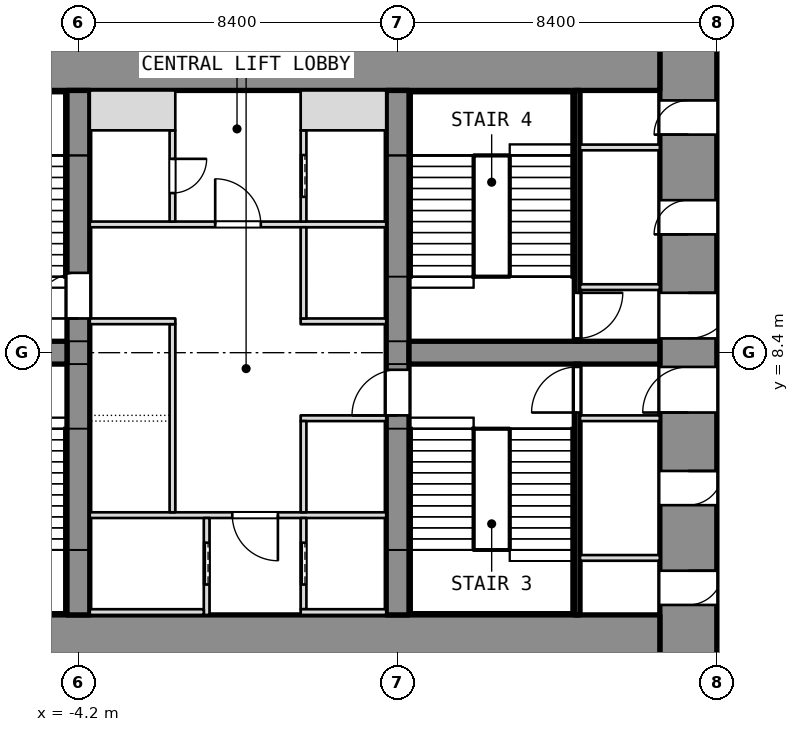
"""IFC4 building model, lengths in metres.
Left out: names, types, materials, properties, quantities, classifications, styles, units other than length and angle.
Written with IfcOpenShell. Run it as: python <this file> out.ifc"""

import sys

from ifc_helpers import new_model, si_unit, direction, frame, frame_2d, origin, place, context, subcontext, project, spatial, rectangle, extrude, element, fill, save


model = new_model("IFC4")
c1 = context("Model", 3, precision=1e-05, world=origin(), true_north=direction((0.0, 1.0)))
c2 = subcontext(c1, "Body", "Model", "MODEL_VIEW")
j1 = project(units=[si_unit("LENGTHUNIT", "METRE"), si_unit("PLANEANGLEUNIT", "RADIAN")], contexts=[c1])
p1 = place(None, origin())
s1 = spatial("IfcSite", under=j1, at=p1, CompositionType="ELEMENT")
p2 = place(p1, origin())
s2 = spatial("IfcBuilding", under=s1, at=p2, CompositionType="ELEMENT")
p3 = place(p2, frame((0.0, 0.0, 13.0)))
s3 = spatial("IfcBuildingStorey", under=s2, at=p3, CompositionType="ELEMENT", Elevation=13.0)
p4 = place(p3, frame((11.85, 0.0, 0.0), z_axis=(0.0, 0.0, 1.0), x_axis=(0.0, 1.0, 0.0)))
e1 = element("IfcWall", 1, at=p4, inside=s3, PredefinedType="SHEAR", context=c2, shape_type="SweptSolid", body=[
    extrude(rectangle(XDim=16.8, YDim=1.5, at=frame_2d((8.4, 0.0))), origin(), (0.0, 0.0, 1.0), 8.0),
])
p5 = place(p4, frame((1.762, 0.0, 0.0)))
e2 = element("IfcOpeningElement", 2, at=p5, cuts=e1, PredefinedType="OPENING", context=c2, shape_type="SweptSolid", body=[
    extrude(rectangle(XDim=0.9, YDim=2.1, at=frame_2d((0.45, 1.05))), frame((0.0, 0.75, 0.0), z_axis=(0.0, -1.0, 0.0), x_axis=(1.0, 0.0, 0.0)), (0.0, 0.0, 1.0), 1.5),
])
p6 = place(p4, frame((4.387, 0.0, 0.0)))
e3 = element("IfcOpeningElement", 3, at=p6, cuts=e1, PredefinedType="OPENING", context=c2, shape_type="SweptSolid", body=[
    extrude(rectangle(XDim=0.9, YDim=2.1, at=frame_2d((0.45, 1.05))), frame((0.0, 0.75, 0.0), z_axis=(0.0, -1.0, 0.0), x_axis=(1.0, 0.0, 0.0)), (0.0, 0.0, 1.0), 1.5),
])
p7 = place(p4, frame((6.825, 0.0, 0.0)))
e4 = element("IfcOpeningElement", 4, at=p7, cuts=e1, PredefinedType="OPENING", context=c2, shape_type="SweptSolid", body=[
    extrude(rectangle(XDim=1.2, YDim=2.1, at=frame_2d((0.6, 1.05))), frame((0.0, 0.75, 0.0), z_axis=(0.0, -1.0, 0.0), x_axis=(1.0, 0.0, 0.0)), (0.0, 0.0, 1.0), 1.5),
])
p8 = place(p4, frame((14.137, 0.0, 0.0)))
e5 = element("IfcOpeningElement", 5, at=p8, cuts=e1, PredefinedType="OPENING", context=c2, shape_type="SweptSolid", body=[
    extrude(rectangle(XDim=0.9, YDim=2.1, at=frame_2d((0.45, 1.05))), frame((0.0, 0.75, 0.0), z_axis=(0.0, -1.0, 0.0), x_axis=(1.0, 0.0, 0.0)), (0.0, 0.0, 1.0), 1.5),
])
p9 = place(p4, frame((11.512, 0.0, 0.0)))
e6 = element("IfcOpeningElement", 6, at=p9, cuts=e1, PredefinedType="OPENING", context=c2, shape_type="SweptSolid", body=[
    extrude(rectangle(XDim=0.9, YDim=2.1, at=frame_2d((0.45, 1.05))), frame((0.0, 0.75, 0.0), z_axis=(0.0, -1.0, 0.0), x_axis=(1.0, 0.0, 0.0)), (0.0, 0.0, 1.0), 1.5),
])
p10 = place(p4, frame((8.775, 0.0, 0.0)))
e7 = element("IfcOpeningElement", 7, at=p10, cuts=e1, PredefinedType="OPENING", context=c2, shape_type="SweptSolid", body=[
    extrude(rectangle(XDim=1.2, YDim=2.1, at=frame_2d((0.6, 1.05))), frame((0.0, 0.75, 0.0), z_axis=(0.0, -1.0, 0.0), x_axis=(1.0, 0.0, 0.0)), (0.0, 0.0, 1.0), 1.5),
])
for number, where, z_axis, x_axis in (
    (8, (-11.1, 0.75, 0.0), (0.0, 0.0, 1.0), (1.0, 0.0, 0.0)),
    (9, (-11.1, 16.05, 0.0), (0.0, 0.0, 1.0), (1.0, 0.0, 0.0)),
):
    element("IfcWall", number, at=place(p3, frame(where, z_axis=z_axis, x_axis=x_axis)), inside=s3, PredefinedType="SHEAR", context=c2, shape_type="SweptSolid", body=[
        extrude(rectangle(XDim=22.2, YDim=1.5, at=frame_2d((11.1, 0.0))), origin(), (0.0, 0.0, 1.0), 8.0),
    ])
p11 = place(p3, frame((-4.2, 1.5, 0.0), z_axis=(0.0, 0.0, 1.0), x_axis=(0.0, 1.0, 0.0)))
e10 = element("IfcWall", 10, at=p11, inside=s3, PredefinedType="SHEAR", context=c2, shape_type="SweptSolid", body=[
    extrude(rectangle(XDim=13.8, YDim=0.6, at=frame_2d((6.9, 0.0))), origin(), (0.0, 0.0, 1.0), 8.0),
])
p12 = place(p11, frame((7.8, 0.0, 0.0)))
e11 = element("IfcOpeningElement", 11, at=p12, cuts=e10, PredefinedType="OPENING", context=c2, shape_type="SweptSolid", body=[
    extrude(rectangle(XDim=1.2, YDim=2.1, at=frame_2d((0.6, 1.05))), frame((0.0, 0.3, 0.0), z_axis=(0.0, -1.0, 0.0), x_axis=(1.0, 0.0, 0.0)), (0.0, 0.0, 1.0), 0.6),
])
p13 = place(p3, frame((4.2, 1.5, 0.0), z_axis=(0.0, 0.0, 1.0), x_axis=(0.0, 1.0, 0.0)))
e12 = element("IfcWall", 12, at=p13, inside=s3, PredefinedType="SHEAR", context=c2, shape_type="SweptSolid", body=[
    extrude(rectangle(XDim=13.8, YDim=0.6, at=frame_2d((6.9, 0.0))), origin(), (0.0, 0.0, 1.0), 8.0),
])
p14 = place(p13, frame((5.25, 0.0, 0.0)))
e13 = element("IfcOpeningElement", 13, at=p14, cuts=e12, PredefinedType="OPENING", context=c2, shape_type="SweptSolid", body=[
    extrude(rectangle(XDim=1.2, YDim=2.1, at=frame_2d((0.6, 1.05))), frame((0.0, 0.3, 0.0), z_axis=(0.0, -1.0, 0.0), x_axis=(1.0, 0.0, 0.0)), (0.0, 0.0, 1.0), 0.6),
])
for number, where, z_axis, x_axis in (
    (14, (-11.1, 8.4, 0.0), (0.0, 0.0, 1.0), (1.0, 0.0, 0.0)),
    (15, (4.5, 8.4, 0.0), (0.0, 0.0, 1.0), (1.0, 0.0, 0.0)),
):
    element("IfcWall", number, at=place(p3, frame(where, z_axis=z_axis, x_axis=x_axis)), inside=s3, PredefinedType="SHEAR", context=c2, shape_type="SweptSolid", body=[
        extrude(rectangle(XDim=6.6, YDim=0.6, at=frame_2d((3.3, 0.0))), origin(), (0.0, 0.0, 1.0), 8.0),
    ])
p15 = place(p3, frame((8.925, 1.5, 0.0), z_axis=(0.0, 0.0, 1.0), x_axis=(0.0, 1.0, 0.0)))
e16 = element("IfcWall", 16, at=p15, inside=s3, PredefinedType="SHEAR", context=c2, shape_type="SweptSolid", body=[
    extrude(rectangle(XDim=6.6, YDim=0.15, at=frame_2d((3.3, 0.0))), origin(), (0.0, 0.0, 1.0), 7.78),
])
p16 = place(p15, frame((5.325, 0.0, 0.0)))
e17 = element("IfcOpeningElement", 17, at=p16, cuts=e16, PredefinedType="OPENING", context=c2, shape_type="SweptSolid", body=[
    extrude(rectangle(XDim=1.2, YDim=2.1, at=frame_2d((0.6, 1.05))), frame((0.0, 0.075, 0.0), z_axis=(0.0, -1.0, 0.0), x_axis=(1.0, 0.0, 0.0)), (0.0, 0.0, 1.0), 0.15),
])
for number, where, z_axis, x_axis in (
    (18, (9.0, 6.675, 0.0), (0.0, 0.0, 1.0), (1.0, 0.0, 0.0)),
    (19, (9.0, 3.0, 0.0), (0.0, 0.0, 1.0), (1.0, 0.0, 0.0)),
):
    element("IfcWall", number, at=place(p3, frame(where, z_axis=z_axis, x_axis=x_axis)), inside=s3, PredefinedType="PARTITIONING", context=c2, shape_type="SweptSolid", body=[
        extrude(rectangle(XDim=2.1, YDim=0.15, at=frame_2d((1.05, 0.0))), origin(), (0.0, 0.0, 1.0), 7.78),
    ])
p17 = place(p3, frame((8.925, 8.7, 0.0), z_axis=(0.0, 0.0, 1.0), x_axis=(0.0, 1.0, 0.0)))
e20 = element("IfcWall", 20, at=p17, inside=s3, PredefinedType="SHEAR", context=c2, shape_type="SweptSolid", body=[
    extrude(rectangle(XDim=6.6, YDim=0.15, at=frame_2d((3.3, 0.0))), origin(), (0.0, 0.0, 1.0), 7.78),
])
p18 = place(p17, frame((0.075, 0.0, 0.0)))
e21 = element("IfcOpeningElement", 21, at=p18, cuts=e20, PredefinedType="OPENING", context=c2, shape_type="SweptSolid", body=[
    extrude(rectangle(XDim=1.2, YDim=2.1, at=frame_2d((0.6, 1.05))), frame((0.0, 0.075, 0.0), z_axis=(0.0, -1.0, 0.0), x_axis=(1.0, 0.0, 0.0)), (0.0, 0.0, 1.0), 0.15),
])
for number, where, z_axis, x_axis in (
    (22, (9.0, 10.125, 0.0), (0.0, 0.0, 1.0), (1.0, 0.0, 0.0)),
    (23, (9.0, 13.8, 0.0), (0.0, 0.0, 1.0), (1.0, 0.0, 0.0)),
):
    element("IfcWall", number, at=place(p3, frame(where, z_axis=z_axis, x_axis=x_axis)), inside=s3, PredefinedType="PARTITIONING", context=c2, shape_type="SweptSolid", body=[
        extrude(rectangle(XDim=2.1, YDim=0.15, at=frame_2d((1.05, 0.0))), origin(), (0.0, 0.0, 1.0), 7.78),
    ])
p19 = place(p3, frame((-3.9, 4.125, 0.0), z_axis=(0.0, 0.0, 1.0), x_axis=(1.0, 0.0, 0.0)))
e24 = element("IfcWall", 24, at=p19, inside=s3, PredefinedType="PARTITIONING", context=c2, shape_type="SweptSolid", body=[
    extrude(rectangle(XDim=7.8, YDim=0.15, at=frame_2d((3.9, 0.0))), origin(), (0.0, 0.0, 1.0), 7.78),
])
p20 = place(p19, frame((3.75, 0.0, 0.0)))
e25 = element("IfcOpeningElement", 25, at=p20, cuts=e24, PredefinedType="OPENING", context=c2, shape_type="SweptSolid", body=[
    extrude(rectangle(XDim=1.2, YDim=2.1, at=frame_2d((0.6, 1.05))), frame((0.0, 0.075, 0.0), z_axis=(0.0, -1.0, 0.0), x_axis=(1.0, 0.0, 0.0)), (0.0, 0.0, 1.0), 0.15),
])
p21 = place(p3, frame((-3.9, 11.775, 0.0), z_axis=(0.0, 0.0, 1.0), x_axis=(1.0, 0.0, 0.0)))
e26 = element("IfcWall", 26, at=p21, inside=s3, PredefinedType="PARTITIONING", context=c2, shape_type="SweptSolid", body=[
    extrude(rectangle(XDim=7.8, YDim=0.15, at=frame_2d((3.9, 0.0))), origin(), (0.0, 0.0, 1.0), 7.78),
])
p22 = place(p21, frame((3.3, 0.0, 0.0)))
e27 = element("IfcOpeningElement", 27, at=p22, cuts=e26, PredefinedType="OPENING", context=c2, shape_type="SweptSolid", body=[
    extrude(rectangle(XDim=1.2, YDim=2.1, at=frame_2d((0.6, 1.05))), frame((0.0, 0.075, 0.0), z_axis=(0.0, -1.0, 0.0), x_axis=(1.0, 0.0, 0.0)), (0.0, 0.0, 1.0), 0.15),
])
p23 = place(p3, frame((-0.825, 1.5, 0.0), z_axis=(0.0, 0.0, 1.0), x_axis=(0.0, 1.0, 0.0)))
e28 = element("IfcWall", 28, at=p23, inside=s3, PredefinedType="SHEAR", context=c2, shape_type="SweptSolid", body=[
    extrude(rectangle(XDim=2.55, YDim=0.15, at=frame_2d((1.275, 0.0))), origin(), (0.0, 0.0, 1.0), 8.0),
])
p24 = place(p23, frame((0.8, 0.0, 0.0)))
e29 = element("IfcOpeningElement", 29, at=p24, cuts=e28, PredefinedType="OPENING", context=c2, shape_type="SweptSolid", body=[
    extrude(rectangle(XDim=1.1, YDim=2.1, at=frame_2d((0.55, 1.05))), frame((0.0, 0.075, 0.0), z_axis=(0.0, -1.0, 0.0), x_axis=(1.0, 0.0, 0.0)), (0.0, 0.0, 1.0), 0.15),
])
p25 = place(p3, frame((-3.9, 1.575, 0.0), z_axis=(0.0, 0.0, 1.0), x_axis=(1.0, 0.0, 0.0)))
e30 = element("IfcWall", 30, at=p25, inside=s3, PredefinedType="SHEAR", context=c2, shape_type="SweptSolid", body=[
    extrude(rectangle(XDim=3.0, YDim=0.15, at=frame_2d((1.5, 0.0))), origin(), (0.0, 0.0, 1.0), 8.0),
])
p26 = place(p3, frame((-1.725, 4.2, 0.0), z_axis=(0.0, 0.0, 1.0), x_axis=(0.0, 1.0, 0.0)))
e31 = element("IfcWall", 31, at=p26, inside=s3, PredefinedType="SHEAR", context=c2, shape_type="SweptSolid", body=[
    extrude(rectangle(XDim=4.95, YDim=0.15, at=frame_2d((2.475, 0.0))), origin(), (0.0, 0.0, 1.0), 8.0),
])
p27 = place(p3, frame((-3.9, 9.225, 0.0), z_axis=(0.0, 0.0, 1.0), x_axis=(1.0, 0.0, 0.0)))
e32 = element("IfcWall", 32, at=p27, inside=s3, PredefinedType="SHEAR", context=c2, shape_type="SweptSolid", body=[
    extrude(rectangle(XDim=2.25, YDim=0.15, at=frame_2d((1.125, 0.0))), origin(), (0.0, 0.0, 1.0), 8.0),
])
p28 = place(p3, frame((-1.725, 11.85, 0.0), z_axis=(0.0, 0.0, 1.0), x_axis=(0.0, 1.0, 0.0)))
e33 = element("IfcWall", 33, at=p28, inside=s3, PredefinedType="PARTITIONING", context=c2, shape_type="SweptSolid", body=[
    extrude(rectangle(XDim=2.4, YDim=0.15, at=frame_2d((1.2, 0.0))), origin(), (0.0, 0.0, 1.0), 7.78),
])
p29 = place(p28, frame((0.75, 0.0, 0.0)))
e34 = element("IfcOpeningElement", 34, at=p29, cuts=e33, PredefinedType="OPENING", context=c2, shape_type="SweptSolid", body=[
    extrude(rectangle(XDim=0.9, YDim=2.1, at=frame_2d((0.45, 1.05))), frame((0.0, 0.075, 0.0), z_axis=(0.0, -1.0, 0.0), x_axis=(1.0, 0.0, 0.0)), (0.0, 0.0, 1.0), 0.15),
])
p30 = place(p3, frame((-3.9, 14.775, 0.0), z_axis=(0.0, 0.0, 1.0), x_axis=(1.0, 0.0, 0.0)))
e35 = element("IfcWall", 35, at=p30, inside=s3, PredefinedType="PARTITIONING", context=c2, shape_type="SweptSolid", body=[
    extrude(rectangle(XDim=2.25, YDim=1.05, at=frame_2d((1.125, 0.0))), origin(), (0.0, 0.0, 1.0), 7.78),
])
p31 = place(p3, frame((1.725, 1.65, 0.0), z_axis=(0.0, 0.0, 1.0), x_axis=(0.0, 1.0, 0.0)))
e36 = element("IfcWall", 36, at=p31, inside=s3, PredefinedType="SHEAR", context=c2, shape_type="SweptSolid", body=[
    extrude(rectangle(XDim=2.4, YDim=0.15, at=frame_2d((1.2, 0.0))), origin(), (0.0, 0.0, 1.0), 8.0),
])
p32 = place(p31, frame((0.65, 0.0, 0.0)))
e37 = element("IfcOpeningElement", 37, at=p32, cuts=e36, PredefinedType="OPENING", context=c2, shape_type="SweptSolid", body=[
    extrude(rectangle(XDim=1.1, YDim=2.1, at=frame_2d((0.55, 1.05))), frame((0.0, 0.075, 0.0), z_axis=(0.0, -1.0, 0.0), x_axis=(1.0, 0.0, 0.0)), (0.0, 0.0, 1.0), 0.15),
])
p33 = place(p3, frame((1.65, 1.575, 0.0), z_axis=(0.0, 0.0, 1.0), x_axis=(1.0, 0.0, 0.0)))
e38 = element("IfcWall", 38, at=p33, inside=s3, PredefinedType="SHEAR", context=c2, shape_type="SweptSolid", body=[
    extrude(rectangle(XDim=2.25, YDim=0.15, at=frame_2d((1.125, 0.0))), origin(), (0.0, 0.0, 1.0), 8.0),
])
p34 = place(p3, frame((1.725, 11.85, 0.0), z_axis=(0.0, 0.0, 1.0), x_axis=(0.0, 1.0, 0.0)))
e39 = element("IfcWall", 39, at=p34, inside=s3, PredefinedType="SHEAR", context=c2, shape_type="SweptSolid", body=[
    extrude(rectangle(XDim=2.4, YDim=0.15, at=frame_2d((1.2, 0.0))), origin(), (0.0, 0.0, 1.0), 8.0),
])
p35 = place(p34, frame((0.65, 0.0, 0.0)))
e40 = element("IfcOpeningElement", 40, at=p35, cuts=e39, PredefinedType="OPENING", context=c2, shape_type="SweptSolid", body=[
    extrude(rectangle(XDim=1.1, YDim=2.1, at=frame_2d((0.55, 1.05))), frame((0.0, 0.075, 0.0), z_axis=(0.0, -1.0, 0.0), x_axis=(1.0, 0.0, 0.0)), (0.0, 0.0, 1.0), 0.15),
])
p36 = place(p3, frame((1.65, 14.775, 0.0), z_axis=(0.0, 0.0, 1.0), x_axis=(1.0, 0.0, 0.0)))
e41 = element("IfcWall", 41, at=p36, inside=s3, PredefinedType="SHEAR", context=c2, shape_type="SweptSolid", body=[
    extrude(rectangle(XDim=2.25, YDim=1.05, at=frame_2d((1.125, 0.0))), origin(), (0.0, 0.0, 1.0), 8.0),
])
for number, where, z_axis, x_axis in (
    (42, (1.65, 6.675, 0.0), (0.0, 0.0, 1.0), (1.0, 0.0, 0.0)),
    (43, (1.65, 9.225, 0.0), (0.0, 0.0, 1.0), (1.0, 0.0, 0.0)),
):
    element("IfcWall", number, at=place(p3, frame(where, z_axis=z_axis, x_axis=x_axis)), inside=s3, PredefinedType="SHEAR", context=c2, shape_type="SweptSolid", body=[
        extrude(rectangle(XDim=2.25, YDim=0.15, at=frame_2d((1.125, 0.0))), origin(), (0.0, 0.0, 1.0), 8.0),
    ])
p37 = place(p3, frame((1.725, 4.2, 0.0), z_axis=(0.0, 0.0, 1.0), x_axis=(0.0, 1.0, 0.0)))
e44 = element("IfcWall", 44, at=p37, inside=s3, PredefinedType="SHEAR", context=c2, shape_type="SweptSolid", body=[
    extrude(rectangle(XDim=2.4, YDim=0.15, at=frame_2d((1.2, 0.0))), origin(), (0.0, 0.0, 1.0), 8.0),
])
p38 = place(p3, frame((1.725, 9.3, 0.0), z_axis=(0.0, 0.0, 1.0), x_axis=(0.0, 1.0, 0.0)))
e45 = element("IfcWall", 45, at=p38, inside=s3, PredefinedType="SHEAR", context=c2, shape_type="SweptSolid", body=[
    extrude(rectangle(XDim=2.4, YDim=0.15, at=frame_2d((1.2, 0.0))), origin(), (0.0, 0.0, 1.0), 8.0),
])
p39 = place(p5, origin())
e46 = element("IfcDoor", 46, at=p39, inside=s3, OperationType="SINGLE_SWING_LEFT", PredefinedType="DOOR", context=c2, shape_type="SweptSolid", body=[
    extrude(rectangle(XDim=0.9, YDim=2.1, at=frame_2d((0.45, 1.05))), frame((0.0, 0.025, 0.0), z_axis=(0.0, -1.0, 0.0), x_axis=(1.0, 0.0, 0.0)), (0.0, 0.0, 1.0), 0.05),
])
fill(e2, e46)
p40 = place(p6, origin())
e47 = element("IfcDoor", 47, at=p40, inside=s3, OperationType="SINGLE_SWING_LEFT", PredefinedType="DOOR", context=c2, shape_type="SweptSolid", body=[
    extrude(rectangle(XDim=0.9, YDim=2.1, at=frame_2d((0.45, 1.05))), frame((0.0, 0.025, 0.0), z_axis=(0.0, -1.0, 0.0), x_axis=(1.0, 0.0, 0.0)), (0.0, 0.0, 1.0), 0.05),
])
fill(e3, e47)
p41 = place(p7, origin())
e48 = element("IfcDoor", 48, at=p41, inside=s3, OperationType="SINGLE_SWING_LEFT", PredefinedType="DOOR", context=c2, shape_type="SweptSolid", body=[
    extrude(rectangle(XDim=1.2, YDim=2.1, at=frame_2d((0.6, 1.05))), frame((0.0, 0.025, 0.0), z_axis=(0.0, -1.0, 0.0), x_axis=(1.0, 0.0, 0.0)), (0.0, 0.0, 1.0), 0.05),
])
fill(e4, e48)
p42 = place(p16, origin())
e49 = element("IfcDoor", 49, at=p42, inside=s3, OperationType="SINGLE_SWING_LEFT", PredefinedType="DOOR", context=c2, shape_type="SweptSolid", body=[
    extrude(rectangle(XDim=1.2, YDim=2.1, at=frame_2d((0.6, 1.05))), frame((0.0, 0.025, 0.0), z_axis=(0.0, -1.0, 0.0), x_axis=(1.0, 0.0, 0.0)), (0.0, 0.0, 1.0), 0.05),
])
fill(e17, e49)
p43 = place(p8, origin())
e50 = element("IfcDoor", 50, at=p43, inside=s3, OperationType="SINGLE_SWING_LEFT", PredefinedType="DOOR", context=c2, shape_type="SweptSolid", body=[
    extrude(rectangle(XDim=0.9, YDim=2.1, at=frame_2d((0.45, 1.05))), frame((0.0, 0.025, 0.0), z_axis=(0.0, -1.0, 0.0), x_axis=(1.0, 0.0, 0.0)), (0.0, 0.0, 1.0), 0.05),
])
fill(e5, e50)
p44 = place(p9, origin())
e51 = element("IfcDoor", 51, at=p44, inside=s3, OperationType="SINGLE_SWING_LEFT", PredefinedType="DOOR", context=c2, shape_type="SweptSolid", body=[
    extrude(rectangle(XDim=0.9, YDim=2.1, at=frame_2d((0.45, 1.05))), frame((0.0, 0.025, 0.0), z_axis=(0.0, -1.0, 0.0), x_axis=(1.0, 0.0, 0.0)), (0.0, 0.0, 1.0), 0.05),
])
fill(e6, e51)
p45 = place(p10, origin())
e52 = element("IfcDoor", 52, at=p45, inside=s3, OperationType="SINGLE_SWING_LEFT", PredefinedType="DOOR", context=c2, shape_type="SweptSolid", body=[
    extrude(rectangle(XDim=1.2, YDim=2.1, at=frame_2d((0.6, 1.05))), frame((0.0, 0.025, 0.0), z_axis=(0.0, -1.0, 0.0), x_axis=(1.0, 0.0, 0.0)), (0.0, 0.0, 1.0), 0.05),
])
fill(e7, e52)
p46 = place(p18, origin())
e53 = element("IfcDoor", 53, at=p46, inside=s3, OperationType="SINGLE_SWING_LEFT", PredefinedType="DOOR", context=c2, shape_type="SweptSolid", body=[
    extrude(rectangle(XDim=1.2, YDim=2.1, at=frame_2d((0.6, 1.05))), frame((0.0, 0.025, 0.0), z_axis=(0.0, -1.0, 0.0), x_axis=(1.0, 0.0, 0.0)), (0.0, 0.0, 1.0), 0.05),
])
fill(e21, e53)
p47 = place(p24, origin())
e54 = element("IfcDoor", 54, at=p47, inside=s3, OperationType="SLIDING_TO_LEFT", PredefinedType="DOOR", context=c2, shape_type="SweptSolid", body=[
    extrude(rectangle(XDim=1.1, YDim=2.1, at=frame_2d((0.55, 1.05))), frame((0.0, 0.025, 0.0), z_axis=(0.0, -1.0, 0.0), x_axis=(1.0, 0.0, 0.0)), (0.0, 0.0, 1.0), 0.05),
])
fill(e29, e54)
p48 = place(p32, origin())
e55 = element("IfcDoor", 55, at=p48, inside=s3, OperationType="SLIDING_TO_LEFT", PredefinedType="DOOR", context=c2, shape_type="SweptSolid", body=[
    extrude(rectangle(XDim=1.1, YDim=2.1, at=frame_2d((0.55, 1.05))), frame((0.0, 0.025, 0.0), z_axis=(0.0, -1.0, 0.0), x_axis=(1.0, 0.0, 0.0)), (0.0, 0.0, 1.0), 0.05),
])
fill(e37, e55)
p49 = place(p35, origin())
e56 = element("IfcDoor", 56, at=p49, inside=s3, OperationType="SLIDING_TO_LEFT", PredefinedType="DOOR", context=c2, shape_type="SweptSolid", body=[
    extrude(rectangle(XDim=1.1, YDim=2.1, at=frame_2d((0.55, 1.05))), frame((0.0, 0.025, 0.0), z_axis=(0.0, -1.0, 0.0), x_axis=(1.0, 0.0, 0.0)), (0.0, 0.0, 1.0), 0.05),
])
fill(e40, e56)
p50 = place(p20, origin())
e57 = element("IfcDoor", 57, at=p50, inside=s3, OperationType="SINGLE_SWING_LEFT", PredefinedType="DOOR", context=c2, shape_type="SweptSolid", body=[
    extrude(rectangle(XDim=1.2, YDim=2.1, at=frame_2d((0.6, 1.05))), frame((0.0, 0.025, 0.0), z_axis=(0.0, -1.0, 0.0), x_axis=(1.0, 0.0, 0.0)), (0.0, 0.0, 1.0), 0.05),
])
fill(e25, e57)
p51 = place(p22, origin())
e58 = element("IfcDoor", 58, at=p51, inside=s3, OperationType="SINGLE_SWING_LEFT", PredefinedType="DOOR", context=c2, shape_type="SweptSolid", body=[
    extrude(rectangle(XDim=1.2, YDim=2.1, at=frame_2d((0.6, 1.05))), frame((0.0, 0.025, 0.0), z_axis=(0.0, -1.0, 0.0), x_axis=(1.0, 0.0, 0.0)), (0.0, 0.0, 1.0), 0.05),
])
fill(e27, e58)
p52 = place(p29, origin())
e59 = element("IfcDoor", 59, at=p52, inside=s3, OperationType="SINGLE_SWING_LEFT", PredefinedType="DOOR", context=c2, shape_type="SweptSolid", body=[
    extrude(rectangle(XDim=0.9, YDim=2.1, at=frame_2d((0.45, 1.05))), frame((0.0, 0.025, 0.0), z_axis=(0.0, -1.0, 0.0), x_axis=(1.0, 0.0, 0.0)), (0.0, 0.0, 1.0), 0.05),
])
fill(e34, e59)
p53 = place(p12, origin())
e60 = element("IfcDoor", 60, at=p53, inside=s3, OperationType="SINGLE_SWING_LEFT", PredefinedType="DOOR", context=c2, shape_type="SweptSolid", body=[
    extrude(rectangle(XDim=1.2, YDim=2.1, at=frame_2d((0.6, 1.05))), frame((0.0, 0.025, 0.0), z_axis=(0.0, -1.0, 0.0), x_axis=(1.0, 0.0, 0.0)), (0.0, 0.0, 1.0), 0.05),
])
fill(e11, e60)
p54 = place(p14, origin())
e61 = element("IfcDoor", 61, at=p54, inside=s3, OperationType="SINGLE_SWING_LEFT", PredefinedType="DOOR", context=c2, shape_type="SweptSolid", body=[
    extrude(rectangle(XDim=1.2, YDim=2.1, at=frame_2d((0.6, 1.05))), frame((0.0, 0.025, 0.0), z_axis=(0.0, -1.0, 0.0), x_axis=(1.0, 0.0, 0.0)), (0.0, 0.0, 1.0), 0.05),
])
fill(e13, e61)
save(model, sys.argv[1])
